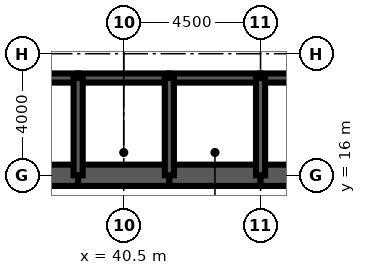
"""IFC4 building model, lengths in metres.
Left out: names, types, materials, properties, quantities, classifications, styles, units other than length and angle.
Written with IfcOpenShell. Run it as: python <this file> out.ifc"""

import sys

from ifc_helpers import new_model, si_unit, direction, frame, frame_2d, origin, place, context, subcontext, project, spatial, rectangle, extrude, element, fill, save


model = new_model("IFC4")
c1 = context("Model", 3, precision=1e-05, world=origin(), true_north=direction((0.0, 1.0)))
c2 = subcontext(c1, "Body", "Model", "MODEL_VIEW")
j1 = project(units=[si_unit("LENGTHUNIT", "METRE"), si_unit("PLANEANGLEUNIT", "RADIAN")], contexts=[c1])
p1 = place(None, origin())
s1 = spatial("IfcSite", under=j1, at=p1, CompositionType="ELEMENT")
p2 = place(p1, origin())
s2 = spatial("IfcBuilding", under=s1, at=p2, CompositionType="ELEMENT")
p3 = place(p2, frame((0.0, 0.0, 325.7)))
s3 = spatial("IfcBuildingStorey", under=s2, at=p3, CompositionType="ELEMENT", Elevation=325.7)
for number, where, z_axis, x_axis in (
    (1, (36.0, 16.0, 0.0), (0.0, 0.0, 1.0), (1.0, 0.0, 0.0)),
    (2, (39.0, 16.0, 0.0), (0.0, 0.0, 1.0), (1.0, 0.0, 0.0)),
    (3, (42.0, 16.0, 0.0), (0.0, 0.0, 1.0), (1.0, 0.0, 0.0)),
):
    element("IfcWall", number, at=place(p3, frame(where, z_axis=z_axis, x_axis=x_axis)), inside=s3, PredefinedType="SHEAR", context=c2, shape_type="SweptSolid", body=[
        extrude(rectangle(XDim=3.0, YDim=0.7, at=frame_2d((1.5, 0.0))), origin(), (0.0, 0.0, 1.0), 4.2),
    ])
p4 = place(p3, frame((45.0, 16.0, 0.0), z_axis=(0.0, 0.0, 1.0), x_axis=(1.0, 0.0, 0.0)))
e4 = element("IfcWall", 4, at=p4, inside=s3, PredefinedType="SHEAR", context=c2, shape_type="SweptSolid", body=[
    extrude(rectangle(XDim=9.35, YDim=0.7, at=frame_2d((4.675, 0.0))), origin(), (0.0, 0.0, 1.0), 4.2),
])
p5 = place(p3, frame((36.0, 19.2, 0.0), z_axis=(0.0, 0.0, 1.0), x_axis=(1.0, 0.0, 0.0)))
e5 = element("IfcWall", 5, at=p5, inside=s3, PredefinedType="SOLIDWALL", context=c2, shape_type="SweptSolid", body=[
    extrude(rectangle(XDim=3.0, YDim=0.3, at=frame_2d((1.5, 0.0))), origin(), (0.0, 0.0, 1.0), 4.2),
])
p6 = place(p5, frame((0.95, 0.0, 0.0)))
e6 = element("IfcOpeningElement", 6, at=p6, cuts=e5, PredefinedType="OPENING", context=c2, shape_type="SweptSolid", body=[
    extrude(rectangle(XDim=1.1, YDim=2.2, at=frame_2d((0.55, 1.1))), frame((0.0, 0.16, 0.0), z_axis=(0.0, -1.0, 0.0), x_axis=(1.0, 0.0, 0.0)), (0.0, 0.0, 1.0), 0.32),
])
p7 = place(p3, frame((39.0, 19.2, 0.0), z_axis=(0.0, 0.0, 1.0), x_axis=(1.0, 0.0, 0.0)))
e7 = element("IfcWall", 7, at=p7, inside=s3, PredefinedType="SOLIDWALL", context=c2, shape_type="SweptSolid", body=[
    extrude(rectangle(XDim=3.0, YDim=0.3, at=frame_2d((1.5, 0.0))), origin(), (0.0, 0.0, 1.0), 4.2),
])
p8 = place(p7, frame((1.0, 0.0, 0.0)))
e8 = element("IfcOpeningElement", 8, at=p8, cuts=e7, PredefinedType="OPENING", context=c2, shape_type="SweptSolid", body=[
    extrude(rectangle(XDim=1.0, YDim=2.1, at=frame_2d((0.5, 1.05))), frame((0.0, 0.16, 0.0), z_axis=(0.0, -1.0, 0.0), x_axis=(1.0, 0.0, 0.0)), (0.0, 0.0, 1.0), 0.32),
])
p9 = place(p3, frame((42.0, 19.2, 0.0), z_axis=(0.0, 0.0, 1.0), x_axis=(1.0, 0.0, 0.0)))
e9 = element("IfcWall", 9, at=p9, inside=s3, PredefinedType="SOLIDWALL", context=c2, shape_type="SweptSolid", body=[
    extrude(rectangle(XDim=3.0, YDim=0.3, at=frame_2d((1.5, 0.0))), origin(), (0.0, 0.0, 1.0), 4.2),
])
p10 = place(p9, frame((1.0, 0.0, 0.0)))
e10 = element("IfcOpeningElement", 10, at=p10, cuts=e9, PredefinedType="OPENING", context=c2, shape_type="SweptSolid", body=[
    extrude(rectangle(XDim=1.0, YDim=2.1, at=frame_2d((0.5, 1.05))), frame((0.0, 0.16, 0.0), z_axis=(0.0, -1.0, 0.0), x_axis=(1.0, 0.0, 0.0)), (0.0, 0.0, 1.0), 0.32),
])
p11 = place(p3, frame((45.0, 19.2, 0.0), z_axis=(0.0, 0.0, 1.0), x_axis=(1.0, 0.0, 0.0)))
e11 = element("IfcWall", 11, at=p11, inside=s3, PredefinedType="SOLIDWALL", context=c2, shape_type="SweptSolid", body=[
    extrude(rectangle(XDim=9.0, YDim=0.3, at=frame_2d((4.5, 0.0))), origin(), (0.0, 0.0, 1.0), 4.2),
])
p12 = place(p11, frame((7.35, 0.0, 0.0)))
e12 = element("IfcOpeningElement", 12, at=p12, cuts=e11, PredefinedType="OPENING", context=c2, shape_type="SweptSolid", body=[
    extrude(rectangle(XDim=1.0, YDim=2.1, at=frame_2d((0.5, 1.05))), frame((0.0, 0.16, 0.0), z_axis=(0.0, -1.0, 0.0), x_axis=(1.0, 0.0, 0.0)), (0.0, 0.0, 1.0), 0.32),
])
for number, where, z_axis, x_axis in (
    (13, (39.0, 16.0, 0.0), (0.0, 0.0, 1.0), (0.0, 1.0, 0.0)),
    (14, (42.0, 16.0, 0.0), (0.0, 0.0, 1.0), (0.0, 1.0, 0.0)),
    (15, (45.0, 16.0, 0.0), (0.0, 0.0, 1.0), (0.0, 1.0, 0.0)),
):
    element("IfcWall", number, at=place(p3, frame(where, z_axis=z_axis, x_axis=x_axis)), inside=s3, PredefinedType="SOLIDWALL", context=c2, shape_type="SweptSolid", body=[
        extrude(rectangle(XDim=3.2, YDim=0.3, at=frame_2d((1.6, 0.0))), origin(), (0.0, 0.0, 1.0), 4.2),
    ])
p13 = place(p3, frame((39.15, 17.3, 0.0), z_axis=(0.0, 0.0, 1.0), x_axis=(1.0, 0.0, 0.0)))
e16 = element("IfcWall", 16, at=p13, inside=s3, PredefinedType="SOLIDWALL", context=c2, shape_type="SweptSolid", body=[
    extrude(rectangle(XDim=2.7, YDim=0.3, at=frame_2d((1.35, 0.0))), origin(), (0.0, 0.0, 1.0), 4.04),
])
p14 = place(p13, frame((0.85, 0.0, 0.0)))
e17 = element("IfcOpeningElement", 17, at=p14, cuts=e16, PredefinedType="OPENING", context=c2, shape_type="SweptSolid", body=[
    extrude(rectangle(XDim=1.0, YDim=2.1, at=frame_2d((0.5, 1.05))), frame((0.0, 0.16, 0.0), z_axis=(0.0, -1.0, 0.0), x_axis=(1.0, 0.0, 0.0)), (0.0, 0.0, 1.0), 0.32),
])
p15 = place(p3, frame((42.15, 17.3, 0.0), z_axis=(0.0, 0.0, 1.0), x_axis=(1.0, 0.0, 0.0)))
e18 = element("IfcWall", 18, at=p15, inside=s3, PredefinedType="SOLIDWALL", context=c2, shape_type="SweptSolid", body=[
    extrude(rectangle(XDim=2.7, YDim=0.3, at=frame_2d((1.35, 0.0))), origin(), (0.0, 0.0, 1.0), 4.04),
])
p16 = place(p15, frame((0.85, 0.0, 0.0)))
e19 = element("IfcOpeningElement", 19, at=p16, cuts=e18, PredefinedType="OPENING", context=c2, shape_type="SweptSolid", body=[
    extrude(rectangle(XDim=1.0, YDim=2.1, at=frame_2d((0.5, 1.05))), frame((0.0, 0.16, 0.0), z_axis=(0.0, -1.0, 0.0), x_axis=(1.0, 0.0, 0.0)), (0.0, 0.0, 1.0), 0.32),
])
p17 = place(p14, origin())
e20 = element("IfcDoor", 20, at=p17, inside=s3, OperationType="SINGLE_SWING_LEFT", PredefinedType="DOOR", context=c2, shape_type="SweptSolid", body=[
    extrude(rectangle(XDim=1.0, YDim=2.1, at=frame_2d((0.5, 1.05))), frame((0.0, 0.025, 0.0), z_axis=(0.0, -1.0, 0.0), x_axis=(1.0, 0.0, 0.0)), (0.0, 0.0, 1.0), 0.05),
])
fill(e17, e20)
p18 = place(p16, origin())
e21 = element("IfcDoor", 21, at=p18, inside=s3, OperationType="SINGLE_SWING_LEFT", PredefinedType="DOOR", context=c2, shape_type="SweptSolid", body=[
    extrude(rectangle(XDim=1.0, YDim=2.1, at=frame_2d((0.5, 1.05))), frame((0.0, 0.025, 0.0), z_axis=(0.0, -1.0, 0.0), x_axis=(1.0, 0.0, 0.0)), (0.0, 0.0, 1.0), 0.05),
])
fill(e19, e21)
p19 = place(p8, origin())
e22 = element("IfcDoor", 22, at=p19, inside=s3, OperationType="SINGLE_SWING_LEFT", PredefinedType="DOOR", context=c2, shape_type="SweptSolid", body=[
    extrude(rectangle(XDim=1.0, YDim=2.1, at=frame_2d((0.5, 1.05))), frame((0.0, 0.025, 0.0), z_axis=(0.0, -1.0, 0.0), x_axis=(1.0, 0.0, 0.0)), (0.0, 0.0, 1.0), 0.05),
])
fill(e8, e22)
p20 = place(p10, origin())
e23 = element("IfcDoor", 23, at=p20, inside=s3, OperationType="SINGLE_SWING_LEFT", PredefinedType="DOOR", context=c2, shape_type="SweptSolid", body=[
    extrude(rectangle(XDim=1.0, YDim=2.1, at=frame_2d((0.5, 1.05))), frame((0.0, 0.025, 0.0), z_axis=(0.0, -1.0, 0.0), x_axis=(1.0, 0.0, 0.0)), (0.0, 0.0, 1.0), 0.05),
])
fill(e10, e23)
save(model, sys.argv[1])
